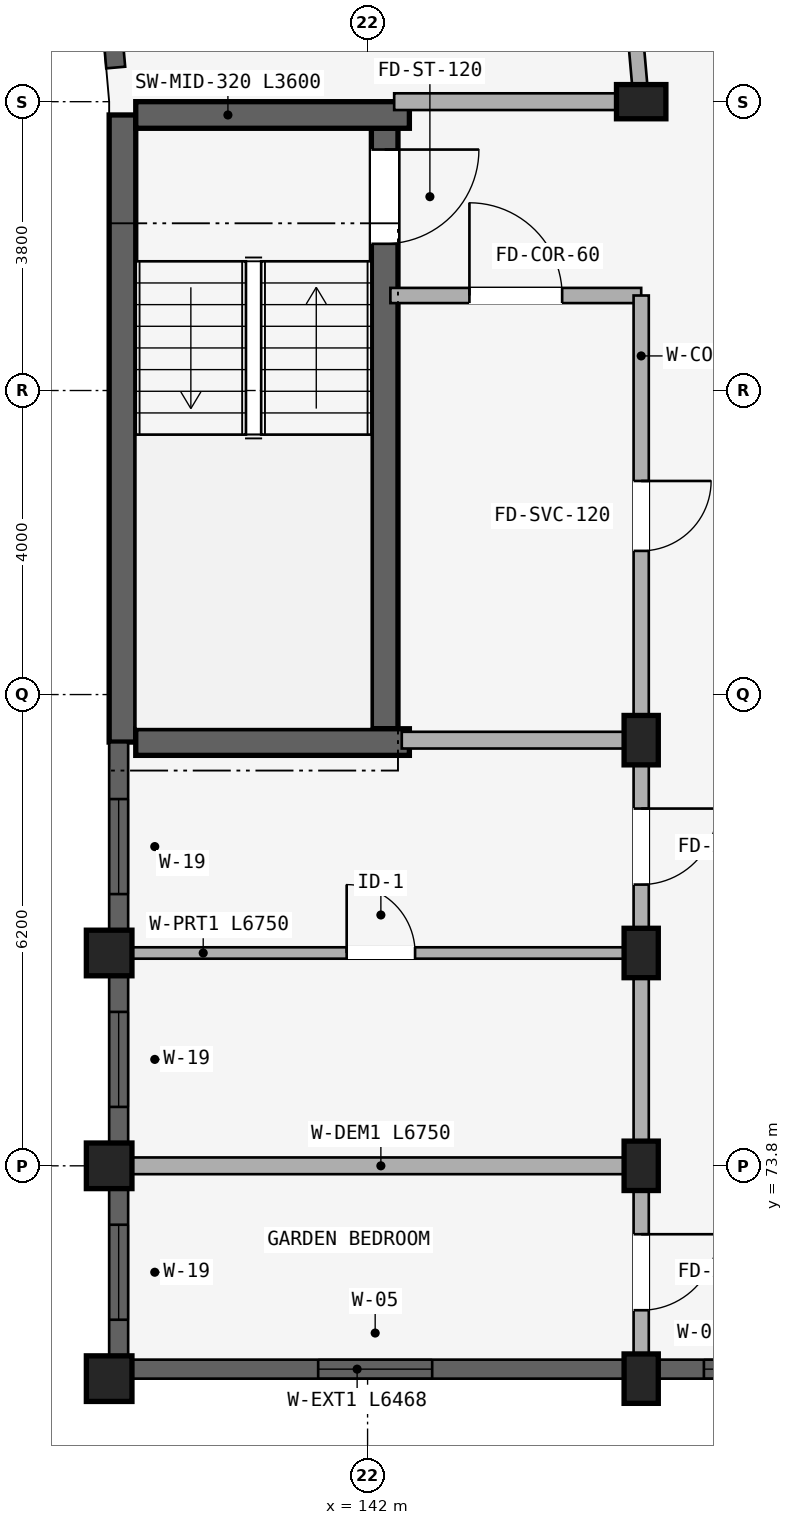
"""IFC4 building model, lengths in metres.
Left out: names, types, materials, properties, quantities, classifications, styles, units other than length and angle.
Written with IfcOpenShell. Run it as: python <this file> out.ifc"""

import sys

from ifc_helpers import new_model, si_unit, direction, frame, frame_2d, origin, origin_2d, place, context, subcontext, project, spatial, rectangle, extrude, element, fill, save


model = new_model("IFC4")
c1 = context("Model", 3, precision=1e-05, world=origin(), true_north=direction((0.0, 1.0)))
c2 = subcontext(c1, "Body", "Model", "MODEL_VIEW")
j1 = project(units=[si_unit("LENGTHUNIT", "METRE"), si_unit("PLANEANGLEUNIT", "RADIAN")], contexts=[c1])
p1 = place(None, origin())
s1 = spatial("IfcSite", under=j1, at=p1, CompositionType="ELEMENT")
p2 = place(p1, origin())
s2 = spatial("IfcBuilding", under=s1, at=p2, CompositionType="ELEMENT")
p3 = place(p2, frame((0.0, 0.0, 37.05)))
s3 = spatial("IfcBuildingStorey", under=s2, at=p3, CompositionType="ELEMENT", Elevation=37.05)
p4 = place(p3, frame((138.775, 87.625, 0.0), z_axis=(0.0, 0.0, 1.0), x_axis=(0.0, -1.0, 0.0)))
e1 = element("IfcWall", 1, at=p4, inside=s3, PredefinedType="SHEAR", context=c2, shape_type="SweptSolid", body=[
    extrude(rectangle(XDim=8.25, YDim=0.35, at=frame_2d((4.125, 0.0))), origin(), (0.0, 0.0, 1.0), 2.93),
])
p5 = place(p3, frame((142.225, 87.45, 0.0), z_axis=(0.0, 0.0, 1.0), x_axis=(0.0, -1.0, 0.0)))
e2 = element("IfcWall", 2, at=p5, inside=s3, PredefinedType="SHEAR", context=c2, shape_type="SweptSolid", body=[
    extrude(rectangle(XDim=7.9, YDim=0.35, at=frame_2d((3.95, 0.0))), origin(), (0.0, 0.0, 1.0), 2.93),
])
p6 = place(p5, frame((0.28, 0.0, 0.0)))
e3 = element("IfcOpeningElement", 3, at=p6, cuts=e2, PredefinedType="OPENING", context=c2, shape_type="SweptSolid", body=[
    extrude(rectangle(XDim=1.24, YDim=2.15, at=frame_2d((0.62, 1.075))), frame((0.0, 0.185, 0.0), z_axis=(0.0, -1.0, 0.0), x_axis=(1.0, 0.0, 0.0)), (0.0, 0.0, 1.0), 0.37),
])
for number, where, z_axis, x_axis in (
    (4, (138.95, 87.625, 0.0), (0.0, 0.0, 1.0), (1.0, 0.0, 0.0)),
    (5, (138.95, 79.375, 0.0), (0.0, 0.0, 1.0), (1.0, 0.0, 0.0)),
):
    element("IfcWall", number, at=place(p3, frame(where, z_axis=z_axis, x_axis=x_axis)), inside=s3, PredefinedType="SHEAR", context=c2, shape_type="SweptSolid", body=[
        extrude(rectangle(XDim=3.6, YDim=0.35, at=frame_2d((1.8, 0.0))), origin(), (0.0, 0.0, 1.0), 2.93),
    ])
for number, where, z_axis, x_axis in (
    (6, (145.6, 87.8, 0.0), (0.0, 0.0, 1.0), (0.0, 1.0, 0.0)),
    (7, (145.6, 79.4, 0.0), (0.0, 0.0, 1.0), (1.0, 0.0, 0.0)),
):
    element("IfcColumn", number, at=place(p3, frame(where, z_axis=z_axis, x_axis=x_axis)), inside=s3, PredefinedType="COLUMN", context=c2, shape_type="SweptSolid", body=[
        extrude(rectangle(XDim=0.45, YDim=0.65, at=origin_2d()), origin(), (0.0, 0.0, 1.0), 2.93),
    ])
p7 = place(p3, frame((138.6, 76.6, 0.0), z_axis=(0.0, 0.0, 1.0), x_axis=(1.0, 0.0, 0.0)))
e8 = element("IfcColumn", 8, at=p7, inside=s3, PredefinedType="COLUMN", context=c2, shape_type="SweptSolid", body=[
    extrude(rectangle(XDim=0.6, YDim=0.6, at=origin_2d()), origin(), (0.0, 0.0, 1.0), 2.93),
])
p8 = place(p3, frame((145.6, 76.6, 0.0), z_axis=(0.0, 0.0, 1.0), x_axis=(1.0, 0.0, 0.0)))
e9 = element("IfcColumn", 9, at=p8, inside=s3, PredefinedType="COLUMN", context=c2, shape_type="SweptSolid", body=[
    extrude(rectangle(XDim=0.45, YDim=0.65, at=origin_2d()), origin(), (0.0, 0.0, 1.0), 2.93),
])
p9 = place(p3, frame((138.6, 73.8, 0.0), z_axis=(0.0, 0.0, 1.0), x_axis=(1.0, 0.0, 0.0)))
e10 = element("IfcColumn", 10, at=p9, inside=s3, PredefinedType="COLUMN", context=c2, shape_type="SweptSolid", body=[
    extrude(rectangle(XDim=0.6, YDim=0.6, at=origin_2d()), origin(), (0.0, 0.0, 1.0), 2.93),
])
p10 = place(p3, frame((145.6, 73.8, 0.0), z_axis=(0.0, 0.0, 1.0), x_axis=(1.0, 0.0, 0.0)))
e11 = element("IfcColumn", 11, at=p10, inside=s3, PredefinedType="COLUMN", context=c2, shape_type="SweptSolid", body=[
    extrude(rectangle(XDim=0.45, YDim=0.65, at=origin_2d()), origin(), (0.0, 0.0, 1.0), 2.93),
])
p11 = place(p3, frame((138.6, 71.0, 0.0), z_axis=(0.0, 0.0, 1.0), x_axis=(1.0, 0.0, 0.0)))
e12 = element("IfcColumn", 12, at=p11, inside=s3, PredefinedType="COLUMN", context=c2, shape_type="SweptSolid", body=[
    extrude(rectangle(XDim=0.6, YDim=0.6, at=origin_2d()), origin(), (0.0, 0.0, 1.0), 2.93),
])
p12 = place(p3, frame((145.6, 71.0, 0.0), z_axis=(0.0, 0.0, 1.0), x_axis=(1.0, 0.0, 0.0)))
e13 = element("IfcColumn", 13, at=p12, inside=s3, PredefinedType="COLUMN", context=c2, shape_type="SweptSolid", body=[
    extrude(rectangle(XDim=0.45, YDim=0.65, at=origin_2d()), origin(), (0.0, 0.0, 1.0), 2.93),
])
p13 = place(p3, frame((142.3, 85.25, 0.0), z_axis=(0.0, 0.0, 1.0), x_axis=(1.0, 0.0, 0.0)))
e14 = element("IfcWall", 14, at=p13, inside=s3, PredefinedType="STANDARD", context=c2, shape_type="SweptSolid", body=[
    extrude(rectangle(XDim=3.3, YDim=0.2, at=frame_2d((1.65, 0.0))), origin(), (0.0, 0.0, 1.0), 2.372),
])
p14 = place(p13, frame((1.04, 0.0, 0.0)))
e15 = element("IfcOpeningElement", 15, at=p14, cuts=e14, PredefinedType="OPENING", context=c2, shape_type="SweptSolid", body=[
    extrude(rectangle(XDim=1.22, YDim=2.15, at=frame_2d((0.61, 1.075))), frame((0.0, 0.11, 0.0), z_axis=(0.0, -1.0, 0.0), x_axis=(1.0, 0.0, 0.0)), (0.0, 0.0, 1.0), 0.22),
])
p15 = place(p3, frame((145.6, 85.25, 0.0), z_axis=(0.0, 0.0, 1.0), x_axis=(0.0, -1.0, 0.0)))
e16 = element("IfcWall", 16, at=p15, inside=s3, PredefinedType="STANDARD", context=c2, shape_type="SweptSolid", body=[
    extrude(rectangle(XDim=5.8, YDim=0.2, at=frame_2d((2.9, 0.0))), origin(), (0.0, 0.0, 1.0), 2.372),
])
p16 = place(p15, frame((2.44, 0.0, 0.0)))
e17 = element("IfcOpeningElement", 17, at=p16, cuts=e16, PredefinedType="OPENING", context=c2, shape_type="SweptSolid", body=[
    extrude(rectangle(XDim=0.92, YDim=2.1, at=frame_2d((0.46, 1.05))), frame((0.0, 0.11, 0.0), z_axis=(0.0, -1.0, 0.0), x_axis=(1.0, 0.0, 0.0)), (0.0, 0.0, 1.0), 0.22),
])
p17 = place(p3, frame((145.208, 92.28, 0.0), z_axis=(0.0, 0.0, 1.0), x_axis=(0.087187153726, -0.996191949488, 0.0)))
e18 = element("IfcWall", 18, at=p17, inside=s3, PredefinedType="STANDARD", context=c2, shape_type="SweptSolid", body=[
    extrude(rectangle(XDim=4.497, YDim=0.2, at=frame_2d((2.249, 0.0))), origin(), (0.0, 0.0, 1.0), 2.372),
])
p18 = place(p3, frame((142.35, 87.8, 0.0), z_axis=(0.0, 0.0, 1.0), x_axis=(1.0, 0.0, 0.0)))
e19 = element("IfcWall", 19, at=p18, inside=s3, PredefinedType="STANDARD", context=c2, shape_type="SweptSolid", body=[
    extrude(rectangle(XDim=3.2, YDim=0.22, at=frame_2d((1.6, 0.0))), origin(), (0.0, 0.0, 1.0), 2.372),
])
p19 = place(p3, frame((145.6, 79.4, 0.0), z_axis=(0.0, 0.0, 1.0), x_axis=(0.0, -1.0, 0.0)))
e20 = element("IfcWall", 20, at=p19, inside=s3, PredefinedType="STANDARD", context=c2, shape_type="SweptSolid", body=[
    extrude(rectangle(XDim=2.8, YDim=0.2, at=frame_2d((1.4, 0.0))), origin(), (0.0, 0.0, 1.0), 2.372),
])
p20 = place(p19, frame((0.9, 0.0, 0.0)))
e21 = element("IfcOpeningElement", 21, at=p20, cuts=e20, PredefinedType="OPENING", context=c2, shape_type="SweptSolid", body=[
    extrude(rectangle(XDim=1.0, YDim=2.15, at=frame_2d((0.5, 1.075))), frame((0.0, 0.11, 0.0), z_axis=(0.0, -1.0, 0.0), x_axis=(1.0, 0.0, 0.0)), (0.0, 0.0, 1.0), 0.22),
])
p21 = place(p3, frame((142.45, 79.4, 0.0), z_axis=(0.0, 0.0, 1.0), x_axis=(1.0, 0.0, 0.0)))
e22 = element("IfcWall", 22, at=p21, inside=s3, PredefinedType="STANDARD", context=c2, shape_type="SweptSolid", body=[
    extrude(rectangle(XDim=3.1, YDim=0.22, at=frame_2d((1.55, 0.0))), origin(), (0.0, 0.0, 1.0), 2.372),
])
p22 = place(p3, frame((145.6, 76.6, 0.0), z_axis=(0.0, 0.0, 1.0), x_axis=(0.0, -1.0, 0.0)))
e23 = element("IfcWall", 23, at=p22, inside=s3, PredefinedType="STANDARD", context=c2, shape_type="SweptSolid", body=[
    extrude(rectangle(XDim=2.8, YDim=0.2, at=frame_2d((1.4, 0.0))), origin(), (0.0, 0.0, 1.0), 2.372),
])
p23 = place(p3, frame((138.8, 76.6, 0.0), z_axis=(0.0, 0.0, 1.0), x_axis=(1.0, 0.0, 0.0)))
e24 = element("IfcWall", 24, at=p23, inside=s3, PredefinedType="PARTITIONING", context=c2, shape_type="SweptSolid", body=[
    extrude(rectangle(XDim=6.75, YDim=0.15, at=frame_2d((3.375, 0.0))), origin(), (0.0, 0.0, 1.0), 2.372),
])
p24 = place(p23, frame((2.925, 0.0, 0.0)))
e25 = element("IfcOpeningElement", 25, at=p24, cuts=e24, PredefinedType="OPENING", context=c2, shape_type="SweptSolid", body=[
    extrude(rectangle(XDim=0.9, YDim=2.1, at=frame_2d((0.45, 1.05))), frame((0.0, 0.085, 0.0), z_axis=(0.0, -1.0, 0.0), x_axis=(1.0, 0.0, 0.0)), (0.0, 0.0, 1.0), 0.17),
])
p25 = place(p3, frame((145.6, 73.8, 0.0), z_axis=(0.0, 0.0, 1.0), x_axis=(0.0, -1.0, 0.0)))
e26 = element("IfcWall", 26, at=p25, inside=s3, PredefinedType="STANDARD", context=c2, shape_type="SweptSolid", body=[
    extrude(rectangle(XDim=2.8, YDim=0.2, at=frame_2d((1.4, 0.0))), origin(), (0.0, 0.0, 1.0), 2.372),
])
p26 = place(p25, frame((0.9, 0.0, 0.0)))
e27 = element("IfcOpeningElement", 27, at=p26, cuts=e26, PredefinedType="OPENING", context=c2, shape_type="SweptSolid", body=[
    extrude(rectangle(XDim=1.0, YDim=2.15, at=frame_2d((0.5, 1.075))), frame((0.0, 0.11, 0.0), z_axis=(0.0, -1.0, 0.0), x_axis=(1.0, 0.0, 0.0)), (0.0, 0.0, 1.0), 0.22),
])
p27 = place(p3, frame((138.8, 73.8, 0.0), z_axis=(0.0, 0.0, 1.0), x_axis=(1.0, 0.0, 0.0)))
e28 = element("IfcWall", 28, at=p27, inside=s3, PredefinedType="STANDARD", context=c2, shape_type="SweptSolid", body=[
    extrude(rectangle(XDim=6.75, YDim=0.22, at=frame_2d((3.375, 0.0))), origin(), (0.0, 0.0, 1.0), 2.372),
])
p28 = place(p3, frame((138.463, 90.798, 0.0), z_axis=(0.0, 0.0, 1.0), x_axis=(0.087222589008, -0.996188847542, 0.0)))
e29 = element("IfcWall", 29, at=p28, inside=s3, PredefinedType="STANDARD", context=c2, shape_type="SweptSolid", body=[
    extrude(rectangle(XDim=2.558, YDim=0.25, at=frame_2d((1.279, 0.0))), origin(), (0.0, 0.0, 1.0), 2.422),
])
p29 = place(p28, frame((0.61, 0.0, 0.572)))
e30 = element("IfcOpeningElement", 30, at=p29, cuts=e29, PredefinedType="OPENING", context=c2, shape_type="SweptSolid", body=[
    extrude(rectangle(XDim=1.5, YDim=1.65, at=frame_2d((0.75, 0.825))), frame((0.0, 0.135, 0.0), z_axis=(0.0, -1.0, 0.0), x_axis=(1.0, 0.0, 0.0)), (0.0, 0.0, 1.0), 0.27),
])
p30 = place(p3, frame((138.725, 79.372, 0.0), z_axis=(0.0, 0.0, 1.0), x_axis=(0.0, -1.0, 0.0)))
e31 = element("IfcWall", 31, at=p30, inside=s3, PredefinedType="STANDARD", context=c2, shape_type="SweptSolid", body=[
    extrude(rectangle(XDim=2.468, YDim=0.25, at=frame_2d((1.234, 0.0))), origin(), (0.0, 0.0, 1.0), 2.472),
])
p31 = place(p30, frame((0.747, 0.0, 0.722)))
e32 = element("IfcOpeningElement", 32, at=p31, cuts=e31, PredefinedType="OPENING", context=c2, shape_type="SweptSolid", body=[
    extrude(rectangle(XDim=1.25, YDim=1.55, at=frame_2d((0.625, 0.775))), frame((0.0, 0.135, 0.0), z_axis=(0.0, -1.0, 0.0), x_axis=(1.0, 0.0, 0.0)), (0.0, 0.0, 1.0), 0.27),
])
p32 = place(p3, frame((138.725, 76.296, 0.0), z_axis=(0.0, 0.0, 1.0), x_axis=(0.0, -1.0, 0.0)))
e33 = element("IfcWall", 33, at=p32, inside=s3, PredefinedType="STANDARD", context=c2, shape_type="SweptSolid", body=[
    extrude(rectangle(XDim=2.193, YDim=0.25, at=frame_2d((1.096, 0.0))), origin(), (0.0, 0.0, 1.0), 2.472),
])
p33 = place(p32, frame((0.471, 0.0, 0.722)))
e34 = element("IfcOpeningElement", 34, at=p33, cuts=e33, PredefinedType="OPENING", context=c2, shape_type="SweptSolid", body=[
    extrude(rectangle(XDim=1.25, YDim=1.55, at=frame_2d((0.625, 0.775))), frame((0.0, 0.135, 0.0), z_axis=(0.0, -1.0, 0.0), x_axis=(1.0, 0.0, 0.0)), (0.0, 0.0, 1.0), 0.27),
])
p34 = place(p3, frame((138.725, 73.497, 0.0), z_axis=(0.0, 0.0, 1.0), x_axis=(0.0, -1.0, 0.0)))
e35 = element("IfcWall", 35, at=p34, inside=s3, PredefinedType="STANDARD", context=c2, shape_type="SweptSolid", body=[
    extrude(rectangle(XDim=2.193, YDim=0.25, at=frame_2d((1.097, 0.0))), origin(), (0.0, 0.0, 1.0), 2.472),
])
p35 = place(p34, frame((0.471, 0.0, 0.722)))
e36 = element("IfcOpeningElement", 36, at=p35, cuts=e35, PredefinedType="OPENING", context=c2, shape_type="SweptSolid", body=[
    extrude(rectangle(XDim=1.25, YDim=1.55, at=frame_2d((0.625, 0.775))), frame((0.0, 0.135, 0.0), z_axis=(0.0, -1.0, 0.0), x_axis=(1.0, 0.0, 0.0)), (0.0, 0.0, 1.0), 0.27),
])
p36 = place(p3, frame((138.904, 71.125, 0.0), z_axis=(0.0, 0.0, 1.0), x_axis=(1.0, 0.0, 0.0)))
e37 = element("IfcWall", 37, at=p36, inside=s3, PredefinedType="STANDARD", context=c2, shape_type="SweptSolid", body=[
    extrude(rectangle(XDim=6.468, YDim=0.25, at=frame_2d((3.234, 0.0))), origin(), (0.0, 0.0, 1.0), 2.372),
])
p37 = place(p36, frame((2.447, 0.0, 0.522)))
e38 = element("IfcOpeningElement", 38, at=p37, cuts=e37, PredefinedType="OPENING", context=c2, shape_type="SweptSolid", body=[
    extrude(rectangle(XDim=1.5, YDim=1.65, at=frame_2d((0.75, 0.825))), frame((0.0, 0.135, 0.0), z_axis=(0.0, -1.0, 0.0), x_axis=(1.0, 0.0, 0.0)), (0.0, 0.0, 1.0), 0.27),
])
p38 = place(p3, frame((145.829, 71.125, 0.0), z_axis=(0.0, 0.0, 1.0), x_axis=(1.0, 0.0, 0.0)))
e39 = element("IfcWall", 39, at=p38, inside=s3, PredefinedType="STANDARD", context=c2, shape_type="SweptSolid", body=[
    extrude(rectangle(XDim=1.943, YDim=0.25, at=frame_2d((0.971, 0.0))), origin(), (0.0, 0.0, 1.0), 2.372),
])
p39 = place(p38, frame((0.596, 0.0, 0.88)))
e40 = element("IfcOpeningElement", 40, at=p39, cuts=e39, PredefinedType="OPENING", context=c2, shape_type="SweptSolid", body=[
    extrude(rectangle(XDim=0.75, YDim=1.05, at=frame_2d((0.375, 0.525))), frame((0.0, 0.135, 0.0), z_axis=(0.0, -1.0, 0.0), x_axis=(1.0, 0.0, 0.0)), (0.0, 0.0, 1.0), 0.27),
])
p40 = place(p31, origin())
e41 = element("IfcWindow", 41, at=p40, inside=s3, PartitioningType="SINGLE_PANEL", PredefinedType="WINDOW", context=c2, shape_type="SweptSolid", body=[
    extrude(rectangle(XDim=1.25, YDim=1.55, at=frame_2d((0.625, 0.775))), frame((0.0, 0.03, 0.0), z_axis=(0.0, -1.0, 0.0), x_axis=(1.0, 0.0, 0.0)), (0.0, 0.0, 1.0), 0.06),
])
fill(e32, e41)
p41 = place(p33, origin())
e42 = element("IfcWindow", 42, at=p41, inside=s3, PartitioningType="SINGLE_PANEL", PredefinedType="WINDOW", context=c2, shape_type="SweptSolid", body=[
    extrude(rectangle(XDim=1.25, YDim=1.55, at=frame_2d((0.625, 0.775))), frame((0.0, 0.03, 0.0), z_axis=(0.0, -1.0, 0.0), x_axis=(1.0, 0.0, 0.0)), (0.0, 0.0, 1.0), 0.06),
])
fill(e34, e42)
p42 = place(p35, origin())
e43 = element("IfcWindow", 43, at=p42, inside=s3, PartitioningType="SINGLE_PANEL", PredefinedType="WINDOW", context=c2, shape_type="SweptSolid", body=[
    extrude(rectangle(XDim=1.25, YDim=1.55, at=frame_2d((0.625, 0.775))), frame((0.0, 0.03, 0.0), z_axis=(0.0, -1.0, 0.0), x_axis=(1.0, 0.0, 0.0)), (0.0, 0.0, 1.0), 0.06),
])
fill(e36, e43)
p43 = place(p37, origin())
e44 = element("IfcWindow", 44, at=p43, inside=s3, PartitioningType="DOUBLE_PANEL_VERTICAL", PredefinedType="WINDOW", context=c2, shape_type="SweptSolid", body=[
    extrude(rectangle(XDim=1.5, YDim=1.65, at=frame_2d((0.75, 0.825))), frame((0.0, 0.03, 0.0), z_axis=(0.0, -1.0, 0.0), x_axis=(1.0, 0.0, 0.0)), (0.0, 0.0, 1.0), 0.06),
])
fill(e38, e44)
p44 = place(p39, origin())
e45 = element("IfcWindow", 45, at=p44, inside=s3, PartitioningType="SINGLE_PANEL", PredefinedType="WINDOW", context=c2, shape_type="SweptSolid", body=[
    extrude(rectangle(XDim=0.75, YDim=1.05, at=frame_2d((0.375, 0.525))), frame((0.0, 0.03, 0.0), z_axis=(0.0, -1.0, 0.0), x_axis=(1.0, 0.0, 0.0)), (0.0, 0.0, 1.0), 0.06),
])
fill(e40, e45)
p45 = place(p6, frame((1.24, 0.0, 0.0), z_axis=(0.0, 0.0, 1.0), x_axis=(-1.0, 0.0, 0.0)))
e46 = element("IfcDoor", 46, at=p45, inside=s3, OperationType="SINGLE_SWING_RIGHT", PredefinedType="DOOR", context=c2, shape_type="SweptSolid", body=[
    extrude(rectangle(XDim=1.24, YDim=2.15, at=frame_2d((0.62, 1.075))), frame((0.0, 0.025, 0.0), z_axis=(0.0, -1.0, 0.0), x_axis=(1.0, 0.0, 0.0)), (0.0, 0.0, 1.0), 0.05),
])
fill(e3, e46)
p46 = place(p14, frame((1.22, 0.0, 0.0), z_axis=(0.0, 0.0, 1.0), x_axis=(-1.0, 0.0, 0.0)))
e47 = element("IfcDoor", 47, at=p46, inside=s3, OperationType="SINGLE_SWING_RIGHT", PredefinedType="DOOR", context=c2, shape_type="SweptSolid", body=[
    extrude(rectangle(XDim=1.22, YDim=2.15, at=frame_2d((0.61, 1.075))), frame((0.0, 0.025, 0.0), z_axis=(0.0, -1.0, 0.0), x_axis=(1.0, 0.0, 0.0)), (0.0, 0.0, 1.0), 0.05),
])
fill(e15, e47)
p47 = place(p16, origin())
e48 = element("IfcDoor", 48, at=p47, inside=s3, OperationType="SINGLE_SWING_LEFT", PredefinedType="DOOR", context=c2, shape_type="SweptSolid", body=[
    extrude(rectangle(XDim=0.92, YDim=2.1, at=frame_2d((0.46, 1.05))), frame((0.0, 0.025, 0.0), z_axis=(0.0, -1.0, 0.0), x_axis=(1.0, 0.0, 0.0)), (0.0, 0.0, 1.0), 0.05),
])
fill(e17, e48)
p48 = place(p20, frame((1.0, 0.0, 0.0), z_axis=(0.0, 0.0, 1.0), x_axis=(-1.0, 0.0, 0.0)))
e49 = element("IfcDoor", 49, at=p48, inside=s3, OperationType="SINGLE_SWING_RIGHT", PredefinedType="DOOR", context=c2, shape_type="SweptSolid", body=[
    extrude(rectangle(XDim=1.0, YDim=2.15, at=frame_2d((0.5, 1.075))), frame((0.0, 0.025, 0.0), z_axis=(0.0, -1.0, 0.0), x_axis=(1.0, 0.0, 0.0)), (0.0, 0.0, 1.0), 0.05),
])
fill(e21, e49)
p49 = place(p24, frame((0.9, 0.0, 0.0), z_axis=(0.0, 0.0, 1.0), x_axis=(-1.0, 0.0, 0.0)))
e50 = element("IfcDoor", 50, at=p49, inside=s3, OperationType="SINGLE_SWING_RIGHT", PredefinedType="DOOR", context=c2, shape_type="SweptSolid", body=[
    extrude(rectangle(XDim=0.9, YDim=2.1, at=frame_2d((0.45, 1.05))), frame((0.0, 0.025, 0.0), z_axis=(0.0, -1.0, 0.0), x_axis=(1.0, 0.0, 0.0)), (0.0, 0.0, 1.0), 0.05),
])
fill(e25, e50)
p50 = place(p26, frame((1.0, 0.0, 0.0), z_axis=(0.0, 0.0, 1.0), x_axis=(-1.0, 0.0, 0.0)))
e51 = element("IfcDoor", 51, at=p50, inside=s3, OperationType="SINGLE_SWING_RIGHT", PredefinedType="DOOR", context=c2, shape_type="SweptSolid", body=[
    extrude(rectangle(XDim=1.0, YDim=2.15, at=frame_2d((0.5, 1.075))), frame((0.0, 0.025, 0.0), z_axis=(0.0, -1.0, 0.0), x_axis=(1.0, 0.0, 0.0)), (0.0, 0.0, 1.0), 0.05),
])
fill(e27, e51)
save(model, sys.argv[1])
